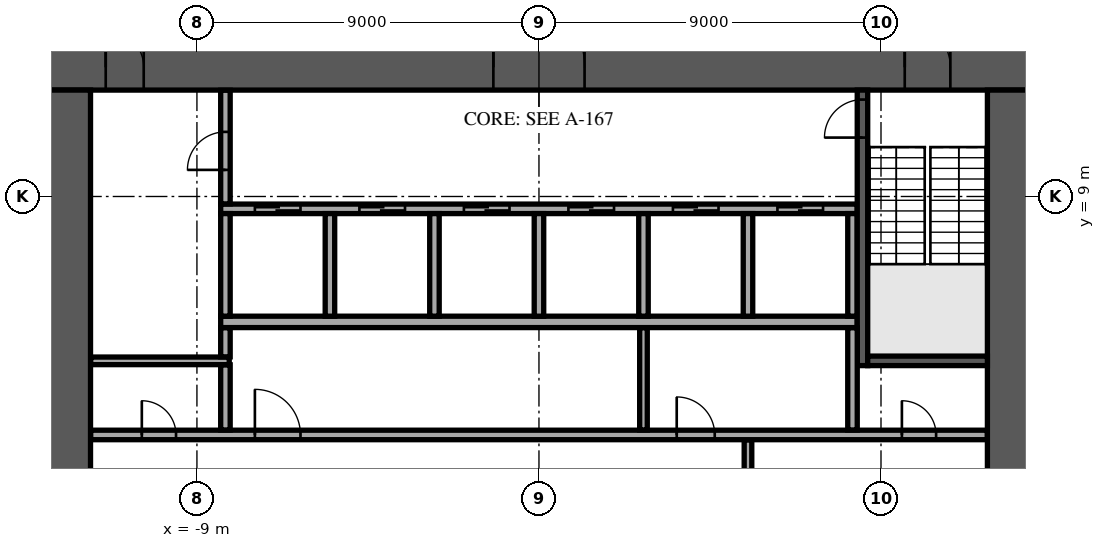
"""IFC4 building model, lengths in metres.
Left out: names, types, materials, properties, quantities, classifications, styles, units other than length and angle.
Written with IfcOpenShell. Run it as: python <this file> out.ifc"""

import sys

from ifc_helpers import new_model, si_unit, direction, frame, frame_2d, origin, place, context, subcontext, project, spatial, rectangle, extrude, element, fill, save


model = new_model("IFC4")
c1 = context("Model", 3, precision=1e-05, world=origin(), true_north=direction((0.0, 1.0)))
c2 = subcontext(c1, "Body", "Model", "MODEL_VIEW")
j1 = project(units=[si_unit("LENGTHUNIT", "METRE"), si_unit("PLANEANGLEUNIT", "RADIAN")], contexts=[c1])
p1 = place(None, origin())
s1 = spatial("IfcSite", under=j1, at=p1, CompositionType="ELEMENT")
p2 = place(p1, origin())
s2 = spatial("IfcBuilding", under=s1, at=p2, CompositionType="ELEMENT")
p3 = place(p2, frame((0.0, 0.0, 18.0)))
s3 = spatial("IfcBuildingStorey", under=s2, at=p3, CompositionType="ELEMENT", Elevation=18.0)
p4 = place(p3, frame((-13.0, 12.4, 0.0), z_axis=(0.0, 0.0, 1.0), x_axis=(1.0, 0.0, 0.0)))
e1 = element("IfcWall", 1, at=p4, inside=s3, PredefinedType="SHEAR", context=c2, shape_type="SweptSolid", body=[
    extrude(rectangle(XDim=26.0, YDim=1.2, at=frame_2d((13.0, 0.0))), origin(), (0.0, 0.0, 1.0), 4.05),
])
p5 = place(p4, frame((11.8, 0.0, 0.0)))
e2 = element("IfcOpeningElement", 2, at=p5, cuts=e1, PredefinedType="OPENING", context=c2, shape_type="SweptSolid", body=[
    extrude(rectangle(XDim=2.4, YDim=2.4, at=frame_2d((1.2, 1.2))), frame((0.0, 0.61, 0.0), z_axis=(0.0, -1.0, 0.0), x_axis=(1.0, 0.0, 0.0)), (0.0, 0.0, 1.0), 1.22),
])
p6 = place(p4, frame((22.625, 0.0, 0.0)))
e3 = element("IfcOpeningElement", 3, at=p6, cuts=e1, PredefinedType="OPENING", context=c2, shape_type="SweptSolid", body=[
    extrude(rectangle(XDim=1.2, YDim=2.1, at=frame_2d((0.6, 1.05))), frame((0.0, 0.61, 0.0), z_axis=(0.0, -1.0, 0.0), x_axis=(1.0, 0.0, 0.0)), (0.0, 0.0, 1.0), 1.22),
])
p7 = place(p4, frame((1.6, 0.0, 0.0)))
e4 = element("IfcOpeningElement", 4, at=p7, cuts=e1, PredefinedType="OPENING", context=c2, shape_type="SweptSolid", body=[
    extrude(rectangle(XDim=1.0, YDim=2.1, at=frame_2d((0.5, 1.05))), frame((0.0, 0.61, 0.0), z_axis=(0.0, -1.0, 0.0), x_axis=(1.0, 0.0, 0.0)), (0.0, 0.0, 1.0), 1.22),
])
p8 = place(p3, frame((12.4, -11.8, 0.0), z_axis=(0.0, 0.0, 1.0), x_axis=(0.0, 1.0, 0.0)))
e5 = element("IfcWall", 5, at=p8, inside=s3, PredefinedType="SHEAR", context=c2, shape_type="SweptSolid", body=[
    extrude(rectangle(XDim=23.6, YDim=1.2, at=frame_2d((11.8, 0.0))), origin(), (0.0, 0.0, 1.0), 4.05),
])
p9 = place(p8, frame((10.6, 0.0, 0.0)))
e6 = element("IfcOpeningElement", 6, at=p9, cuts=e5, PredefinedType="OPENING", context=c2, shape_type="SweptSolid", body=[
    extrude(rectangle(XDim=2.4, YDim=2.4, at=frame_2d((1.2, 1.2))), frame((0.0, 0.61, 0.0), z_axis=(0.0, -1.0, 0.0), x_axis=(1.0, 0.0, 0.0)), (0.0, 0.0, 1.0), 1.22),
])
p10 = place(p3, frame((-12.4, -11.8, 0.0), z_axis=(0.0, 0.0, 1.0), x_axis=(0.0, 1.0, 0.0)))
e7 = element("IfcWall", 7, at=p10, inside=s3, PredefinedType="SHEAR", context=c2, shape_type="SweptSolid", body=[
    extrude(rectangle(XDim=23.6, YDim=1.2, at=frame_2d((11.8, 0.0))), origin(), (0.0, 0.0, 1.0), 4.05),
])
p11 = place(p10, frame((10.6, 0.0, 0.0)))
e8 = element("IfcOpeningElement", 8, at=p11, cuts=e7, PredefinedType="OPENING", context=c2, shape_type="SweptSolid", body=[
    extrude(rectangle(XDim=2.4, YDim=2.4, at=frame_2d((1.2, 1.2))), frame((0.0, 0.61, 0.0), z_axis=(0.0, -1.0, 0.0), x_axis=(1.0, 0.0, 0.0)), (0.0, 0.0, 1.0), 1.22),
])
p12 = place(p3, frame((-8.375, 5.7, 0.0), z_axis=(0.0, 0.0, 1.0), x_axis=(1.0, 0.0, 0.0)))
e9 = element("IfcWall", 9, at=p12, inside=s3, PredefinedType="SOLIDWALL", context=c2, shape_type="SweptSolid", body=[
    extrude(rectangle(XDim=16.75, YDim=0.3, at=frame_2d((8.375, 0.0))), origin(), (0.0, 0.0, 1.0), 4.05),
])
p13 = place(p3, frame((-8.375, 8.675, 0.0), z_axis=(0.0, 0.0, 1.0), x_axis=(1.0, 0.0, 0.0)))
e10 = element("IfcWall", 10, at=p13, inside=s3, PredefinedType="SOLIDWALL", context=c2, shape_type="SweptSolid", body=[
    extrude(rectangle(XDim=16.75, YDim=0.25, at=frame_2d((8.375, 0.0))), origin(), (0.0, 0.0, 1.0), 4.05),
])
p14 = place(p13, frame((0.9, 0.0, 0.0)))
e11 = element("IfcOpeningElement", 11, at=p14, cuts=e10, PredefinedType="OPENING", context=c2, shape_type="SweptSolid", body=[
    extrude(rectangle(XDim=1.2, YDim=2.1, at=frame_2d((0.6, 1.05))), frame((0.0, 0.135, 0.0), z_axis=(0.0, -1.0, 0.0), x_axis=(1.0, 0.0, 0.0)), (0.0, 0.0, 1.0), 0.27),
])
p15 = place(p13, frame((3.65, 0.0, 0.0)))
e12 = element("IfcOpeningElement", 12, at=p15, cuts=e10, PredefinedType="OPENING", context=c2, shape_type="SweptSolid", body=[
    extrude(rectangle(XDim=1.2, YDim=2.1, at=frame_2d((0.6, 1.05))), frame((0.0, 0.135, 0.0), z_axis=(0.0, -1.0, 0.0), x_axis=(1.0, 0.0, 0.0)), (0.0, 0.0, 1.0), 0.27),
])
p16 = place(p13, frame((6.4, 0.0, 0.0)))
e13 = element("IfcOpeningElement", 13, at=p16, cuts=e10, PredefinedType="OPENING", context=c2, shape_type="SweptSolid", body=[
    extrude(rectangle(XDim=1.2, YDim=2.1, at=frame_2d((0.6, 1.05))), frame((0.0, 0.135, 0.0), z_axis=(0.0, -1.0, 0.0), x_axis=(1.0, 0.0, 0.0)), (0.0, 0.0, 1.0), 0.27),
])
p17 = place(p13, frame((9.15, 0.0, 0.0)))
e14 = element("IfcOpeningElement", 14, at=p17, cuts=e10, PredefinedType="OPENING", context=c2, shape_type="SweptSolid", body=[
    extrude(rectangle(XDim=1.2, YDim=2.1, at=frame_2d((0.6, 1.05))), frame((0.0, 0.135, 0.0), z_axis=(0.0, -1.0, 0.0), x_axis=(1.0, 0.0, 0.0)), (0.0, 0.0, 1.0), 0.27),
])
p18 = place(p13, frame((11.9, 0.0, 0.0)))
e15 = element("IfcOpeningElement", 15, at=p18, cuts=e10, PredefinedType="OPENING", context=c2, shape_type="SweptSolid", body=[
    extrude(rectangle(XDim=1.2, YDim=2.1, at=frame_2d((0.6, 1.05))), frame((0.0, 0.135, 0.0), z_axis=(0.0, -1.0, 0.0), x_axis=(1.0, 0.0, 0.0)), (0.0, 0.0, 1.0), 0.27),
])
p19 = place(p13, frame((14.65, 0.0, 0.0)))
e16 = element("IfcOpeningElement", 16, at=p19, cuts=e10, PredefinedType="OPENING", context=c2, shape_type="SweptSolid", body=[
    extrude(rectangle(XDim=1.2, YDim=2.1, at=frame_2d((0.6, 1.05))), frame((0.0, 0.135, 0.0), z_axis=(0.0, -1.0, 0.0), x_axis=(1.0, 0.0, 0.0)), (0.0, 0.0, 1.0), 0.27),
])
for number, where, z_axis, x_axis in (
    (17, (-8.25, 5.85, 0.0), (0.0, 0.0, 1.0), (0.0, 1.0, 0.0)),
    (18, (-5.5, 5.85, 0.0), (0.0, 0.0, 1.0), (0.0, 1.0, 0.0)),
    (19, (-2.75, 5.85, 0.0), (0.0, 0.0, 1.0), (0.0, 1.0, 0.0)),
    (20, (0.0, 5.85, 0.0), (0.0, 0.0, 1.0), (0.0, 1.0, 0.0)),
    (21, (2.75, 5.85, 0.0), (0.0, 0.0, 1.0), (0.0, 1.0, 0.0)),
    (22, (5.5, 5.85, 0.0), (0.0, 0.0, 1.0), (0.0, 1.0, 0.0)),
    (23, (8.25, 5.85, 0.0), (0.0, 0.0, 1.0), (0.0, 1.0, 0.0)),
):
    element("IfcWall", number, at=place(p3, frame(where, z_axis=z_axis, x_axis=x_axis)), inside=s3, PredefinedType="SOLIDWALL", context=c2, shape_type="SweptSolid", body=[
        extrude(rectangle(XDim=2.7, YDim=0.25, at=frame_2d((1.35, 0.0))), origin(), (0.0, 0.0, 1.0), 4.05),
    ])
p20 = place(p3, frame((8.512, 4.55, 0.0), z_axis=(0.0, 0.0, 1.0), x_axis=(0.0, 1.0, 0.0)))
e24 = element("IfcWall", 24, at=p20, inside=s3, PredefinedType="SOLIDWALL", context=c2, shape_type="SweptSolid", body=[
    extrude(rectangle(XDim=7.25, YDim=0.275, at=frame_2d((3.625, 0.0))), origin(), (0.0, 0.0, 1.0), 4.05),
])
p21 = place(p20, frame((6.0, 0.0, 0.0)))
e25 = element("IfcOpeningElement", 25, at=p21, cuts=e24, PredefinedType="OPENING", context=c2, shape_type="SweptSolid", body=[
    extrude(rectangle(XDim=1.0, YDim=2.1, at=frame_2d((0.5, 1.05))), frame((0.0, 0.147, 0.0), z_axis=(0.0, -1.0, 0.0), x_axis=(1.0, 0.0, 0.0)), (0.0, 0.0, 1.0), 0.295),
])
p22 = place(p3, frame((8.65, 4.675, 0.0), z_axis=(0.0, 0.0, 1.0), x_axis=(1.0, 0.0, 0.0)))
e26 = element("IfcWall", 26, at=p22, inside=s3, PredefinedType="SOLIDWALL", context=c2, shape_type="SweptSolid", body=[
    extrude(rectangle(XDim=3.15, YDim=0.25, at=frame_2d((1.575, 0.0))), origin(), (0.0, 0.0, 1.0), 4.05),
])
p23 = place(p3, frame((5.5, -2.595, 0.0), z_axis=(0.0, 0.0, 1.0), x_axis=(0.0, 1.0, 0.0)))
e27 = element("IfcWall", 27, at=p23, inside=s3, PredefinedType="PARTITIONING", context=c2, shape_type="SweptSolid", body=[
    extrude(rectangle(XDim=5.19, YDim=0.2, at=frame_2d((2.595, 0.0))), origin(), (0.0, 0.0, 1.0), 4.05),
])
p24 = place(p23, frame((1.395, 0.0, 0.0)))
e28 = element("IfcOpeningElement", 28, at=p24, cuts=e27, PredefinedType="OPENING", context=c2, shape_type="SweptSolid", body=[
    extrude(rectangle(XDim=2.4, YDim=2.4, at=frame_2d((1.2, 1.2))), frame((0.0, 0.11, 0.0), z_axis=(0.0, -1.0, 0.0), x_axis=(1.0, 0.0, 0.0)), (0.0, 0.0, 1.0), 0.22),
])
p25 = place(p3, frame((-11.795, 2.725, 0.0), z_axis=(0.0, 0.0, 1.0), x_axis=(1.0, 0.0, 0.0)))
e29 = element("IfcWall", 29, at=p25, inside=s3, PredefinedType="PARTITIONING", context=c2, shape_type="SweptSolid", body=[
    extrude(rectangle(XDim=23.59, YDim=0.25, at=frame_2d((11.795, 0.0))), origin(), (0.0, 0.0, 1.0), 4.05),
])
p26 = place(p25, frame((21.345, 0.0, 0.0)))
e30 = element("IfcOpeningElement", 30, at=p26, cuts=e29, PredefinedType="OPENING", context=c2, shape_type="SweptSolid", body=[
    extrude(rectangle(XDim=0.9, YDim=2.1, at=frame_2d((0.45, 1.05))), frame((0.0, 0.135, 0.0), z_axis=(0.0, -1.0, 0.0), x_axis=(1.0, 0.0, 0.0)), (0.0, 0.0, 1.0), 0.27),
])
p27 = place(p25, frame((1.345, 0.0, 0.0)))
e31 = element("IfcOpeningElement", 31, at=p27, cuts=e29, PredefinedType="OPENING", context=c2, shape_type="SweptSolid", body=[
    extrude(rectangle(XDim=0.9, YDim=2.1, at=frame_2d((0.45, 1.05))), frame((0.0, 0.135, 0.0), z_axis=(0.0, -1.0, 0.0), x_axis=(1.0, 0.0, 0.0)), (0.0, 0.0, 1.0), 0.27),
])
p28 = place(p25, frame((4.32, 0.0, 0.0)))
e32 = element("IfcOpeningElement", 32, at=p28, cuts=e29, PredefinedType="OPENING", context=c2, shape_type="SweptSolid", body=[
    extrude(rectangle(XDim=1.2, YDim=2.1, at=frame_2d((0.6, 1.05))), frame((0.0, 0.135, 0.0), z_axis=(0.0, -1.0, 0.0), x_axis=(1.0, 0.0, 0.0)), (0.0, 0.0, 1.0), 0.27),
])
p29 = place(p25, frame((15.42, 0.0, 0.0)))
e33 = element("IfcOpeningElement", 33, at=p29, cuts=e29, PredefinedType="OPENING", context=c2, shape_type="SweptSolid", body=[
    extrude(rectangle(XDim=1.0, YDim=2.1, at=frame_2d((0.5, 1.05))), frame((0.0, 0.135, 0.0), z_axis=(0.0, -1.0, 0.0), x_axis=(1.0, 0.0, 0.0)), (0.0, 0.0, 1.0), 0.27),
])
p30 = place(p3, frame((-8.25, 2.855, 0.0), z_axis=(0.0, 0.0, 1.0), x_axis=(0.0, 1.0, 0.0)))
e34 = element("IfcWall", 34, at=p30, inside=s3, PredefinedType="PARTITIONING", context=c2, shape_type="SweptSolid", body=[
    extrude(rectangle(XDim=1.715, YDim=0.25, at=frame_2d((0.857, 0.0))), origin(), (0.0, 0.0, 1.0), 4.05),
])
p31 = place(p3, frame((2.75, 2.855, 0.0), z_axis=(0.0, 0.0, 1.0), x_axis=(0.0, 1.0, 0.0)))
e35 = element("IfcWall", 35, at=p31, inside=s3, PredefinedType="PARTITIONING", context=c2, shape_type="SweptSolid", body=[
    extrude(rectangle(XDim=2.69, YDim=0.2, at=frame_2d((1.345, 0.0))), origin(), (0.0, 0.0, 1.0), 4.05),
])
p32 = place(p3, frame((8.25, 2.855, 0.0), z_axis=(0.0, 0.0, 1.0), x_axis=(0.0, 1.0, 0.0)))
e36 = element("IfcWall", 36, at=p32, inside=s3, PredefinedType="PARTITIONING", context=c2, shape_type="SweptSolid", body=[
    extrude(rectangle(XDim=2.69, YDim=0.25, at=frame_2d((1.345, 0.0))), origin(), (0.0, 0.0, 1.0), 4.05),
])
p33 = place(p3, frame((-11.795, 4.675, 0.0), z_axis=(0.0, 0.0, 1.0), x_axis=(1.0, 0.0, 0.0)))
e37 = element("IfcWall", 37, at=p33, inside=s3, PredefinedType="PARTITIONING", context=c2, shape_type="SweptSolid", body=[
    extrude(rectangle(XDim=3.645, YDim=0.2, at=frame_2d((1.823, 0.0))), origin(), (0.0, 0.0, 1.0), 4.05),
])
p34 = place(p3, frame((-8.25, 4.78, 0.0), z_axis=(0.0, 0.0, 1.0), x_axis=(0.0, 1.0, 0.0)))
e38 = element("IfcWall", 38, at=p34, inside=s3, PredefinedType="PARTITIONING", context=c2, shape_type="SweptSolid", body=[
    extrude(rectangle(XDim=0.765, YDim=0.25, at=frame_2d((0.382, 0.0))), origin(), (0.0, 0.0, 1.0), 4.05),
])
p35 = place(p3, frame((-8.25, 8.805, 0.0), z_axis=(0.0, 0.0, 1.0), x_axis=(0.0, 1.0, 0.0)))
e39 = element("IfcWall", 39, at=p35, inside=s3, PredefinedType="PARTITIONING", context=c2, shape_type="SweptSolid", body=[
    extrude(rectangle(XDim=2.99, YDim=0.25, at=frame_2d((1.495, 0.0))), origin(), (0.0, 0.0, 1.0), 4.05),
])
p36 = place(p35, frame((0.895, 0.0, 0.0)))
e40 = element("IfcOpeningElement", 40, at=p36, cuts=e39, PredefinedType="OPENING", context=c2, shape_type="SweptSolid", body=[
    extrude(rectangle(XDim=1.0, YDim=2.1, at=frame_2d((0.5, 1.05))), frame((0.0, 0.135, 0.0), z_axis=(0.0, -1.0, 0.0), x_axis=(1.0, 0.0, 0.0)), (0.0, 0.0, 1.0), 0.27),
])
p37 = place(p5, origin())
e41 = element("IfcDoor", 41, at=p37, inside=s3, OperationType="SINGLE_SWING_LEFT", PredefinedType="DOOR", context=c2, shape_type="SweptSolid", body=[
    extrude(rectangle(XDim=2.4, YDim=2.4, at=frame_2d((1.2, 1.2))), frame((0.0, 0.025, 0.0), z_axis=(0.0, -1.0, 0.0), x_axis=(1.0, 0.0, 0.0)), (0.0, 0.0, 1.0), 0.05),
])
fill(e2, e41)
p38 = place(p6, origin())
e42 = element("IfcDoor", 42, at=p38, inside=s3, OperationType="SINGLE_SWING_LEFT", PredefinedType="DOOR", context=c2, shape_type="SweptSolid", body=[
    extrude(rectangle(XDim=1.2, YDim=2.1, at=frame_2d((0.6, 1.05))), frame((0.0, 0.025, 0.0), z_axis=(0.0, -1.0, 0.0), x_axis=(1.0, 0.0, 0.0)), (0.0, 0.0, 1.0), 0.05),
])
fill(e3, e42)
p39 = place(p7, origin())
e43 = element("IfcDoor", 43, at=p39, inside=s3, OperationType="SINGLE_SWING_LEFT", PredefinedType="DOOR", context=c2, shape_type="SweptSolid", body=[
    extrude(rectangle(XDim=1.0, YDim=2.1, at=frame_2d((0.5, 1.05))), frame((0.0, 0.025, 0.0), z_axis=(0.0, -1.0, 0.0), x_axis=(1.0, 0.0, 0.0)), (0.0, 0.0, 1.0), 0.05),
])
fill(e4, e43)
p40 = place(p14, origin())
e44 = element("IfcDoor", 44, at=p40, inside=s3, OperationType="DOUBLE_DOOR_SLIDING", PredefinedType="DOOR", context=c2, shape_type="SweptSolid", body=[
    extrude(rectangle(XDim=1.2, YDim=2.1, at=frame_2d((0.6, 1.05))), frame((0.0, 0.025, 0.0), z_axis=(0.0, -1.0, 0.0), x_axis=(1.0, 0.0, 0.0)), (0.0, 0.0, 1.0), 0.05),
])
fill(e11, e44)
p41 = place(p15, origin())
e45 = element("IfcDoor", 45, at=p41, inside=s3, OperationType="DOUBLE_DOOR_SLIDING", PredefinedType="DOOR", context=c2, shape_type="SweptSolid", body=[
    extrude(rectangle(XDim=1.2, YDim=2.1, at=frame_2d((0.6, 1.05))), frame((0.0, 0.025, 0.0), z_axis=(0.0, -1.0, 0.0), x_axis=(1.0, 0.0, 0.0)), (0.0, 0.0, 1.0), 0.05),
])
fill(e12, e45)
p42 = place(p16, origin())
e46 = element("IfcDoor", 46, at=p42, inside=s3, OperationType="DOUBLE_DOOR_SLIDING", PredefinedType="DOOR", context=c2, shape_type="SweptSolid", body=[
    extrude(rectangle(XDim=1.2, YDim=2.1, at=frame_2d((0.6, 1.05))), frame((0.0, 0.025, 0.0), z_axis=(0.0, -1.0, 0.0), x_axis=(1.0, 0.0, 0.0)), (0.0, 0.0, 1.0), 0.05),
])
fill(e13, e46)
p43 = place(p17, origin())
e47 = element("IfcDoor", 47, at=p43, inside=s3, OperationType="DOUBLE_DOOR_SLIDING", PredefinedType="DOOR", context=c2, shape_type="SweptSolid", body=[
    extrude(rectangle(XDim=1.2, YDim=2.1, at=frame_2d((0.6, 1.05))), frame((0.0, 0.025, 0.0), z_axis=(0.0, -1.0, 0.0), x_axis=(1.0, 0.0, 0.0)), (0.0, 0.0, 1.0), 0.05),
])
fill(e14, e47)
p44 = place(p18, origin())
e48 = element("IfcDoor", 48, at=p44, inside=s3, OperationType="DOUBLE_DOOR_SLIDING", PredefinedType="DOOR", context=c2, shape_type="SweptSolid", body=[
    extrude(rectangle(XDim=1.2, YDim=2.1, at=frame_2d((0.6, 1.05))), frame((0.0, 0.025, 0.0), z_axis=(0.0, -1.0, 0.0), x_axis=(1.0, 0.0, 0.0)), (0.0, 0.0, 1.0), 0.05),
])
fill(e15, e48)
p45 = place(p19, origin())
e49 = element("IfcDoor", 49, at=p45, inside=s3, OperationType="DOUBLE_DOOR_SLIDING", PredefinedType="DOOR", context=c2, shape_type="SweptSolid", body=[
    extrude(rectangle(XDim=1.2, YDim=2.1, at=frame_2d((0.6, 1.05))), frame((0.0, 0.025, 0.0), z_axis=(0.0, -1.0, 0.0), x_axis=(1.0, 0.0, 0.0)), (0.0, 0.0, 1.0), 0.05),
])
fill(e16, e49)
p46 = place(p21, origin())
e50 = element("IfcDoor", 50, at=p46, inside=s3, OperationType="SINGLE_SWING_LEFT", PredefinedType="DOOR", context=c2, shape_type="SweptSolid", body=[
    extrude(rectangle(XDim=1.0, YDim=2.1, at=frame_2d((0.5, 1.05))), frame((0.0, 0.025, 0.0), z_axis=(0.0, -1.0, 0.0), x_axis=(1.0, 0.0, 0.0)), (0.0, 0.0, 1.0), 0.05),
])
fill(e25, e50)
p47 = place(p26, origin())
e51 = element("IfcDoor", 51, at=p47, inside=s3, OperationType="SINGLE_SWING_LEFT", PredefinedType="DOOR", context=c2, shape_type="SweptSolid", body=[
    extrude(rectangle(XDim=0.9, YDim=2.1, at=frame_2d((0.45, 1.05))), frame((0.0, 0.025, 0.0), z_axis=(0.0, -1.0, 0.0), x_axis=(1.0, 0.0, 0.0)), (0.0, 0.0, 1.0), 0.05),
])
fill(e30, e51)
p48 = place(p27, origin())
e52 = element("IfcDoor", 52, at=p48, inside=s3, OperationType="SINGLE_SWING_LEFT", PredefinedType="DOOR", context=c2, shape_type="SweptSolid", body=[
    extrude(rectangle(XDim=0.9, YDim=2.1, at=frame_2d((0.45, 1.05))), frame((0.0, 0.025, 0.0), z_axis=(0.0, -1.0, 0.0), x_axis=(1.0, 0.0, 0.0)), (0.0, 0.0, 1.0), 0.05),
])
fill(e31, e52)
p49 = place(p36, origin())
e53 = element("IfcDoor", 53, at=p49, inside=s3, OperationType="SINGLE_SWING_LEFT", PredefinedType="DOOR", context=c2, shape_type="SweptSolid", body=[
    extrude(rectangle(XDim=1.0, YDim=2.1, at=frame_2d((0.5, 1.05))), frame((0.0, 0.025, 0.0), z_axis=(0.0, -1.0, 0.0), x_axis=(1.0, 0.0, 0.0)), (0.0, 0.0, 1.0), 0.05),
])
fill(e40, e53)
p50 = place(p28, origin())
e54 = element("IfcDoor", 54, at=p50, inside=s3, OperationType="SINGLE_SWING_LEFT", PredefinedType="DOOR", context=c2, shape_type="SweptSolid", body=[
    extrude(rectangle(XDim=1.2, YDim=2.1, at=frame_2d((0.6, 1.05))), frame((0.0, 0.025, 0.0), z_axis=(0.0, -1.0, 0.0), x_axis=(1.0, 0.0, 0.0)), (0.0, 0.0, 1.0), 0.05),
])
fill(e32, e54)
p51 = place(p29, origin())
e55 = element("IfcDoor", 55, at=p51, inside=s3, OperationType="SINGLE_SWING_LEFT", PredefinedType="DOOR", context=c2, shape_type="SweptSolid", body=[
    extrude(rectangle(XDim=1.0, YDim=2.1, at=frame_2d((0.5, 1.05))), frame((0.0, 0.025, 0.0), z_axis=(0.0, -1.0, 0.0), x_axis=(1.0, 0.0, 0.0)), (0.0, 0.0, 1.0), 0.05),
])
fill(e33, e55)
save(model, sys.argv[1])
